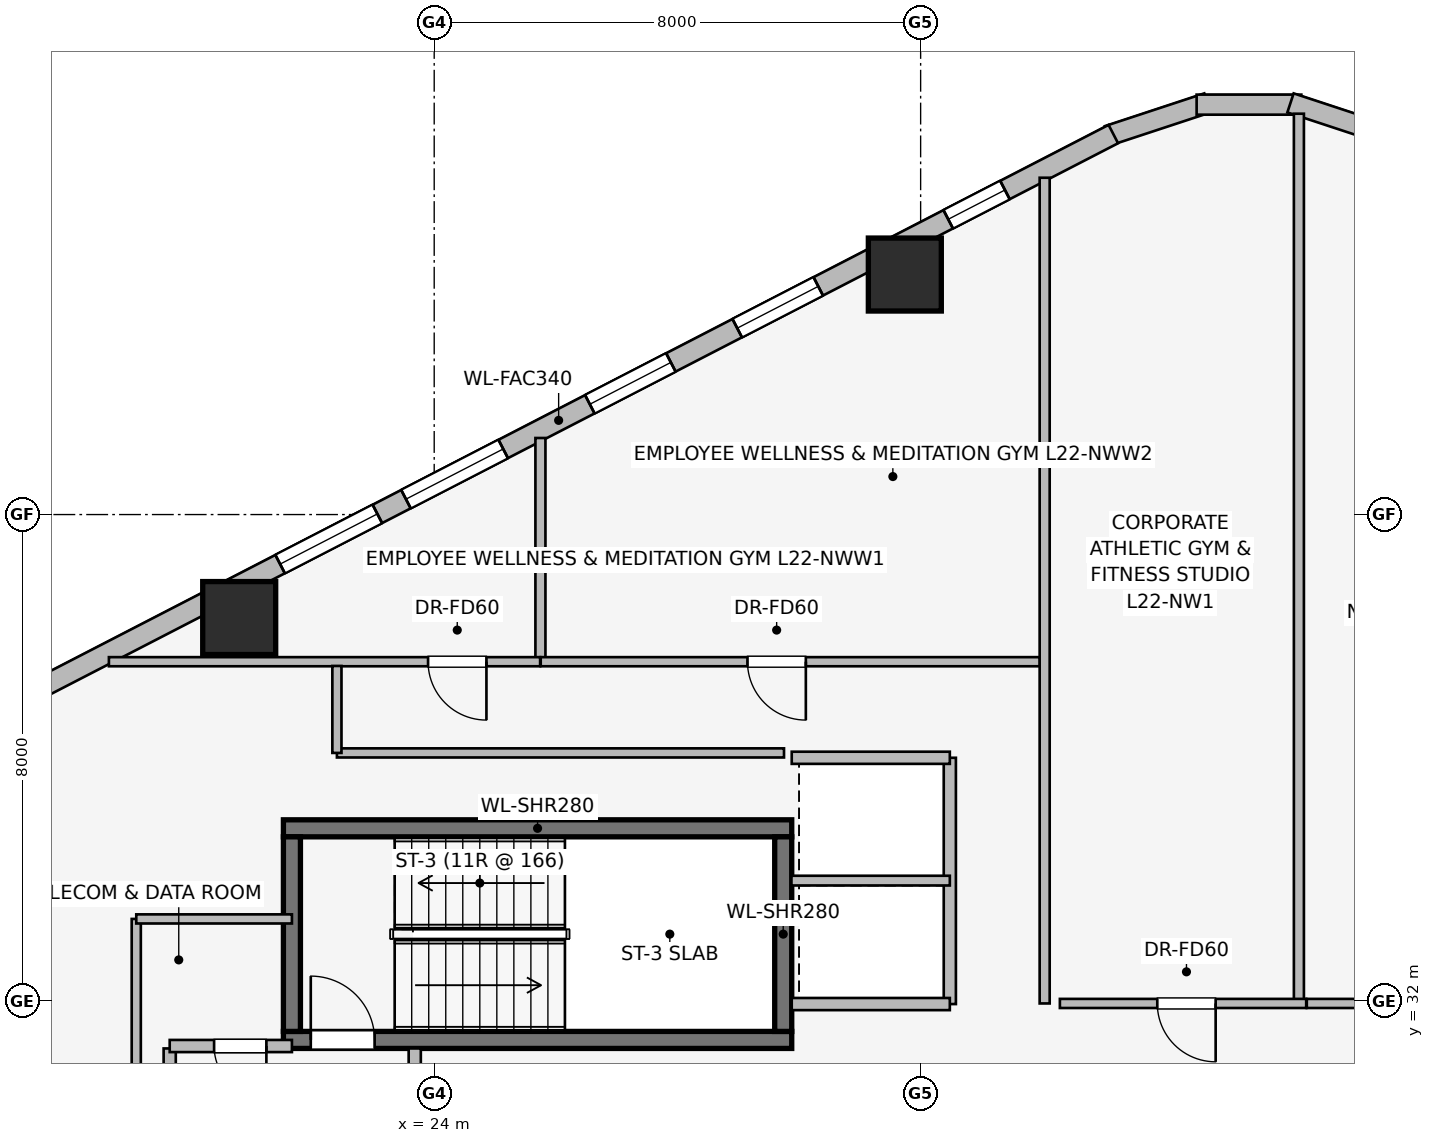
"""IFC4 building model, lengths in metres.
Left out: names, types, materials, properties, quantities, classifications, styles, units other than length and angle.
Written with IfcOpenShell. Run it as: python <this file> out.ifc"""

import sys

from ifc_helpers import new_model, si_unit, direction, frame, frame_2d, origin, origin_2d, place, context, subcontext, project, spatial, rectangle, extrude, element, fill, save


model = new_model("IFC4")
c1 = context("Model", 3, precision=1e-05, world=origin(), true_north=direction((0.0, 1.0)))
c2 = subcontext(c1, "Body", "Model", "MODEL_VIEW")
j1 = project(units=[si_unit("LENGTHUNIT", "METRE"), si_unit("PLANEANGLEUNIT", "RADIAN")], contexts=[c1])
p1 = place(None, origin())
s1 = spatial("IfcSite", under=j1, at=p1, CompositionType="ELEMENT")
p2 = place(p1, origin())
s2 = spatial("IfcBuilding", under=s1, at=p2, CompositionType="ELEMENT")
p3 = place(p2, frame((0.0, 0.0, 85.4)))
s3 = spatial("IfcBuildingStorey", under=s2, at=p3, CompositionType="ELEMENT", Elevation=85.4)
p4 = place(p3, frame((21.52, 31.36, 0.0), z_axis=(0.0, 0.0, 1.0), x_axis=(1.0, 0.0, 0.0)))
e1 = element("IfcWall", 1, at=p4, inside=s3, PredefinedType="SHEAR", context=c2, shape_type="SweptSolid", body=[
    extrude(rectangle(XDim=8.36, YDim=0.28, at=frame_2d((4.18, 0.0))), origin(), (0.0, 0.0, 1.0), 3.65),
])
p5 = place(p4, frame((0.45, 0.0, 0.0)))
e2 = element("IfcOpeningElement", 2, at=p5, cuts=e1, PredefinedType="OPENING", context=c2, shape_type="SweptSolid", body=[
    extrude(rectangle(XDim=1.05, YDim=2.0, at=frame_2d((0.525, 1.0))), frame((0.0, 0.15, 0.0), z_axis=(0.0, -1.0, 0.0), x_axis=(1.0, 0.0, 0.0)), (0.0, 0.0, 1.0), 0.3),
])
p6 = place(p3, frame((29.88, 34.84, 0.0), z_axis=(0.0, 0.0, 1.0), x_axis=(-1.0, 0.0, 0.0)))
e3 = element("IfcWall", 3, at=p6, inside=s3, PredefinedType="SHEAR", context=c2, shape_type="SweptSolid", body=[
    extrude(rectangle(XDim=8.36, YDim=0.28, at=frame_2d((4.18, 0.0))), origin(), (0.0, 0.0, 1.0), 3.65),
])
for number, where, z_axis, x_axis in (
    (4, (21.66, 34.7, 0.0), (0.0, 0.0, 1.0), (0.0, -1.0, 0.0)),
    (5, (29.74, 31.5, 0.0), (0.0, 0.0, 1.0), (0.0, 1.0, 0.0)),
):
    element("IfcWall", number, at=place(p3, frame(where, z_axis=z_axis, x_axis=x_axis)), inside=s3, PredefinedType="SHEAR", context=c2, shape_type="SweptSolid", body=[
        extrude(rectangle(XDim=3.2, YDim=0.28, at=frame_2d((1.6, 0.0))), origin(), (0.0, 0.0, 1.0), 3.65),
    ])
for number, where, z_axis, x_axis in (
    (6, (31.74, 43.947, 0.0), (0.0, 0.0, 1.0), (1.0, 0.0, 0.0)),
    (7, (20.793, 38.298, 0.0), (0.0, 0.0, 1.0), (1.0, 0.0, 0.0)),
):
    element("IfcColumn", number, at=place(p3, frame(where, z_axis=z_axis, x_axis=x_axis)), inside=s3, PredefinedType="COLUMN", context=c2, shape_type="SweptSolid", body=[
        extrude(rectangle(XDim=1.2, YDim=1.2, at=origin_2d()), origin(), (0.0, 0.0, 1.0), 3.65),
    ])
p7 = place(p3, frame((35.081, 46.231, 0.0), z_axis=(0.0, 0.0, 1.0), x_axis=(0.94976901097, 0.312951794691, 0.0)))
e8 = element("IfcWall", 8, at=p7, inside=s3, PredefinedType="STANDARD", context=c2, shape_type="SweptSolid", body=[
    extrude(rectangle(XDim=1.722, YDim=0.33, at=frame_2d((0.861, 0.0))), origin(), (0.0, 0.0, 1.0), 3.39),
])
p8 = place(p3, frame((36.539, 46.741, 0.0), z_axis=(0.0, 0.0, 1.0), x_axis=(1.0, 0.0, 0.0)))
e9 = element("IfcWall", 9, at=p8, inside=s3, PredefinedType="STANDARD", context=c2, shape_type="SweptSolid", body=[
    extrude(rectangle(XDim=1.722, YDim=0.33, at=frame_2d((0.861, 0.0))), origin(), (0.0, 0.0, 1.0), 3.39),
])
p9 = place(p3, frame((38.083, 46.77, 0.0), z_axis=(0.0, 0.0, 1.0), x_axis=(0.94976901097, -0.312951794691, 0.0)))
e10 = element("IfcWall", 10, at=p9, inside=s3, PredefinedType="STANDARD", context=c2, shape_type="SweptSolid", body=[
    extrude(rectangle(XDim=1.722, YDim=0.33, at=frame_2d((0.861, 0.0))), origin(), (0.0, 0.0, 1.0), 3.39),
])
p10 = place(p3, frame((16.924, 36.841, 0.0), z_axis=(0.0, 0.0, 1.0), x_axis=(0.888634413993, 0.458616264721, 0.0)))
e11 = element("IfcWall", 11, at=p10, inside=s3, PredefinedType="STANDARD", context=c2, shape_type="SweptSolid", body=[
    extrude(rectangle(XDim=20.531, YDim=0.34, at=frame_2d((10.266, 0.0))), origin(), (0.0, 0.0, 1.0), 2.684),
])
p11 = place(p10, frame((5.111, 0.0, 0.75)))
e12 = element("IfcOpeningElement", 12, at=p11, cuts=e11, PredefinedType="OPENING", context=c2, shape_type="SweptSolid", body=[
    extrude(rectangle(XDim=1.8, YDim=1.5, at=frame_2d((0.9, 0.75))), frame((0.0, 0.18, 0.0), z_axis=(0.0, -1.0, 0.0), x_axis=(1.0, 0.0, 0.0)), (0.0, 0.0, 1.0), 0.36),
])
p12 = place(p10, frame((7.44, 0.0, 0.75)))
e13 = element("IfcOpeningElement", 13, at=p12, cuts=e11, PredefinedType="OPENING", context=c2, shape_type="SweptSolid", body=[
    extrude(rectangle(XDim=1.8, YDim=1.5, at=frame_2d((0.9, 0.75))), frame((0.0, 0.18, 0.0), z_axis=(0.0, -1.0, 0.0), x_axis=(1.0, 0.0, 0.0)), (0.0, 0.0, 1.0), 0.36),
])
p13 = place(p10, frame((10.843, 0.0, 0.75)))
e14 = element("IfcOpeningElement", 14, at=p13, cuts=e11, PredefinedType="OPENING", context=c2, shape_type="SweptSolid", body=[
    extrude(rectangle(XDim=1.5, YDim=1.5, at=frame_2d((0.75, 0.75))), frame((0.0, 0.18, 0.0), z_axis=(0.0, -1.0, 0.0), x_axis=(1.0, 0.0, 0.0)), (0.0, 0.0, 1.0), 0.36),
])
p14 = place(p10, frame((13.571, 0.0, 0.75)))
e15 = element("IfcOpeningElement", 15, at=p14, cuts=e11, PredefinedType="OPENING", context=c2, shape_type="SweptSolid", body=[
    extrude(rectangle(XDim=1.5, YDim=1.5, at=frame_2d((0.75, 0.75))), frame((0.0, 0.18, 0.0), z_axis=(0.0, -1.0, 0.0), x_axis=(1.0, 0.0, 0.0)), (0.0, 0.0, 1.0), 0.36),
])
p15 = place(p10, frame((17.476, 0.0, 0.75)))
e16 = element("IfcOpeningElement", 16, at=p15, cuts=e11, PredefinedType="OPENING", context=c2, shape_type="SweptSolid", body=[
    extrude(rectangle(XDim=1.05, YDim=1.4, at=frame_2d((0.525, 0.7))), frame((0.0, 0.18, 0.0), z_axis=(0.0, -1.0, 0.0), x_axis=(1.0, 0.0, 0.0)), (0.0, 0.0, 1.0), 0.36),
])
p16 = place(p3, frame((19.65, 25.68, 0.0), z_axis=(0.0, 0.0, 1.0), x_axis=(0.0, 1.0, 0.0)))
e17 = element("IfcWall", 17, at=p16, inside=s3, PredefinedType="PARTITIONING", context=c2, shape_type="SweptSolid", body=[
    extrude(rectangle(XDim=5.54, YDim=0.2, at=frame_2d((2.77, 0.0))), origin(), (0.0, 0.0, 1.0), 3.39),
])
p17 = place(p16, frame((0.62, 0.0, 0.0)))
e18 = element("IfcOpeningElement", 18, at=p17, cuts=e17, PredefinedType="OPENING", context=c2, shape_type="SweptSolid", body=[
    extrude(rectangle(XDim=1.1, YDim=2.2, at=frame_2d((0.55, 1.1))), frame((0.0, 0.11, 0.0), z_axis=(0.0, -1.0, 0.0), x_axis=(1.0, 0.0, 0.0)), (0.0, 0.0, 1.0), 0.22),
])
p18 = place(p16, frame((3.12, 0.0, 0.0)))
e19 = element("IfcOpeningElement", 19, at=p18, cuts=e17, PredefinedType="OPENING", context=c2, shape_type="SweptSolid", body=[
    extrude(rectangle(XDim=1.1, YDim=2.2, at=frame_2d((0.55, 1.1))), frame((0.0, 0.11, 0.0), z_axis=(0.0, -1.0, 0.0), x_axis=(1.0, 0.0, 0.0)), (0.0, 0.0, 1.0), 0.22),
])
p19 = place(p3, frame((23.68, 25.68, 0.0), z_axis=(0.0, 0.0, 1.0), x_axis=(0.0, 1.0, 0.0)))
e20 = element("IfcWall", 20, at=p19, inside=s3, PredefinedType="PARTITIONING", context=c2, shape_type="SweptSolid", body=[
    extrude(rectangle(XDim=5.54, YDim=0.2, at=frame_2d((2.77, 0.0))), origin(), (0.0, 0.0, 1.0), 3.39),
])
p20 = place(p19, frame((1.8, 0.0, 0.0)))
e21 = element("IfcOpeningElement", 21, at=p20, cuts=e20, PredefinedType="OPENING", context=c2, shape_type="SweptSolid", body=[
    extrude(rectangle(XDim=1.05, YDim=2.0, at=frame_2d((0.525, 1.0))), frame((0.0, 0.11, 0.0), z_axis=(0.0, -1.0, 0.0), x_axis=(1.0, 0.0, 0.0)), (0.0, 0.0, 1.0), 0.22),
])
p21 = place(p3, frame((21.66, 31.26, 0.0), z_axis=(0.0, 0.0, 1.0), x_axis=(-1.0, 0.0, 0.0)))
e22 = element("IfcWall", 22, at=p21, inside=s3, PredefinedType="PARTITIONING", context=c2, shape_type="SweptSolid", body=[
    extrude(rectangle(XDim=2.01, YDim=0.2, at=frame_2d((1.005, 0.0))), origin(), (0.0, 0.0, 1.0), 3.39),
])
p22 = place(p21, frame((0.42, 0.0, 0.0)))
e23 = element("IfcOpeningElement", 23, at=p22, cuts=e22, PredefinedType="OPENING", context=c2, shape_type="SweptSolid", body=[
    extrude(rectangle(XDim=0.86, YDim=2.0, at=frame_2d((0.43, 1.0))), frame((0.0, 0.11, 0.0), z_axis=(0.0, -1.0, 0.0), x_axis=(1.0, 0.0, 0.0)), (0.0, 0.0, 1.0), 0.22),
])
p23 = place(p3, frame((32.48, 31.95, 0.0), z_axis=(0.0, 0.0, 1.0), x_axis=(0.0, 1.0, 0.0)))
e24 = element("IfcWall", 24, at=p23, inside=s3, PredefinedType="PARTITIONING", context=c2, shape_type="SweptSolid", body=[
    extrude(rectangle(XDim=4.05, YDim=0.2, at=frame_2d((2.025, 0.0))), origin(), (0.0, 0.0, 1.0), 2.513),
])
for number, where, z_axis, x_axis in (
    (25, (29.88, 36.0, 0.0), (0.0, 0.0, 1.0), (1.0, 0.0, 0.0)),
    (26, (32.48, 31.95, 0.0), (0.0, 0.0, 1.0), (-1.0, 0.0, 0.0)),
):
    element("IfcWall", number, at=place(p3, frame(where, z_axis=z_axis, x_axis=x_axis)), inside=s3, PredefinedType="PARTITIONING", context=c2, shape_type="SweptSolid", body=[
        extrude(rectangle(XDim=2.6, YDim=0.2, at=frame_2d((1.3, 0.0))), origin(), (0.0, 0.0, 1.0), 3.39),
    ])
p24 = place(p3, frame((29.875, 33.98, 0.0), z_axis=(0.0, 0.0, 1.0), x_axis=(1.0, 0.0, 0.0)))
e27 = element("IfcWall", 27, at=p24, inside=s3, PredefinedType="PARTITIONING", context=c2, shape_type="SweptSolid", body=[
    extrude(rectangle(XDim=2.605, YDim=0.16, at=frame_2d((1.302, 0.0))), origin(), (0.0, 0.0, 1.0), 3.39),
])
p25 = place(p3, frame((19.1, 33.35, 0.0), z_axis=(0.0, 0.0, 1.0), x_axis=(0.0, -1.0, 0.0)))
e28 = element("IfcWall", 28, at=p25, inside=s3, PredefinedType="PARTITIONING", context=c2, shape_type="SweptSolid", body=[
    extrude(rectangle(XDim=2.655, YDim=0.15, at=frame_2d((1.328, 0.0))), origin(), (0.0, 0.0, 1.0), 3.39),
])
p26 = place(p3, frame((21.66, 33.35, 0.0), z_axis=(0.0, 0.0, 1.0), x_axis=(-1.0, 0.0, 0.0)))
e29 = element("IfcWall", 29, at=p26, inside=s3, PredefinedType="PARTITIONING", context=c2, shape_type="SweptSolid", body=[
    extrude(rectangle(XDim=2.56, YDim=0.15, at=frame_2d((1.28, 0.0))), origin(), (0.0, 0.0, 1.0), 3.39),
])
p27 = place(p3, frame((25.747, 37.61, 0.0), z_axis=(0.0, 0.0, 1.0), x_axis=(0.0, 1.0, 0.0)))
e30 = element("IfcWall", 30, at=p27, inside=s3, PredefinedType="PARTITIONING", context=c2, shape_type="SweptSolid", body=[
    extrude(rectangle(XDim=3.649, YDim=0.165, at=frame_2d((1.824, 0.0))), origin(), (0.0, 0.0, 1.0), 3.39),
])
p28 = place(p3, frame((25.742, 37.58, 0.0), z_axis=(0.0, 0.0, 1.0), x_axis=(-1.0, 0.0, 0.0)))
e31 = element("IfcWall", 31, at=p28, inside=s3, PredefinedType="PARTITIONING", context=c2, shape_type="SweptSolid", body=[
    extrude(rectangle(XDim=7.092, YDim=0.15, at=frame_2d((3.546, 0.0))), origin(), (0.0, 0.0, 1.0), 3.39),
])
p29 = place(p28, frame((0.883, 0.0, 0.0)))
e32 = element("IfcOpeningElement", 32, at=p29, cuts=e31, PredefinedType="OPENING", context=c2, shape_type="SweptSolid", body=[
    extrude(rectangle(XDim=0.96, YDim=2.0, at=frame_2d((0.48, 1.0))), frame((0.0, 0.085, 0.0), z_axis=(0.0, -1.0, 0.0), x_axis=(1.0, 0.0, 0.0)), (0.0, 0.0, 1.0), 0.17),
])
p30 = place(p3, frame((33.962, 37.58, 0.0), z_axis=(0.0, 0.0, 1.0), x_axis=(-1.0, 0.0, 0.0)))
e33 = element("IfcWall", 33, at=p30, inside=s3, PredefinedType="PARTITIONING", context=c2, shape_type="SweptSolid", body=[
    extrude(rectangle(XDim=8.21, YDim=0.15, at=frame_2d((4.105, 0.0))), origin(), (0.0, 0.0, 1.0), 3.39),
])
p31 = place(p30, frame((3.85, 0.0, 0.0)))
e34 = element("IfcOpeningElement", 34, at=p31, cuts=e33, PredefinedType="OPENING", context=c2, shape_type="SweptSolid", body=[
    extrude(rectangle(XDim=0.96, YDim=2.0, at=frame_2d((0.48, 1.0))), frame((0.0, 0.085, 0.0), z_axis=(0.0, -1.0, 0.0), x_axis=(1.0, 0.0, 0.0)), (0.0, 0.0, 1.0), 0.17),
])
p32 = place(p3, frame((34.04, 31.96, 0.0), z_axis=(0.0, 0.0, 1.0), x_axis=(0.0, 1.0, 0.0)))
e35 = element("IfcWall", 35, at=p32, inside=s3, PredefinedType="PARTITIONING", context=c2, shape_type="SweptSolid", body=[
    extrude(rectangle(XDim=13.579, YDim=0.165, at=frame_2d((6.79, 0.0))), origin(), (0.0, 0.0, 1.0), 3.39),
])
p33 = place(p3, frame((38.221, 31.97, 0.0), z_axis=(0.0, 0.0, 1.0), x_axis=(0.0, 1.0, 0.0)))
e36 = element("IfcWall", 36, at=p33, inside=s3, PredefinedType="PARTITIONING", context=c2, shape_type="SweptSolid", body=[
    extrude(rectangle(XDim=14.622, YDim=0.165, at=frame_2d((7.311, 0.0))), origin(), (0.0, 0.0, 1.0), 3.39),
])
p34 = place(p3, frame((38.341, 31.96, 0.0), z_axis=(0.0, 0.0, 1.0), x_axis=(-1.0, 0.0, 0.0)))
e37 = element("IfcWall", 37, at=p34, inside=s3, PredefinedType="PARTITIONING", context=c2, shape_type="SweptSolid", body=[
    extrude(rectangle(XDim=4.051, YDim=0.15, at=frame_2d((2.025, 0.0))), origin(), (0.0, 0.0, 1.0), 3.39),
])
p35 = place(p34, frame((1.489, 0.0, 0.0)))
e38 = element("IfcOpeningElement", 38, at=p35, cuts=e37, PredefinedType="OPENING", context=c2, shape_type="SweptSolid", body=[
    extrude(rectangle(XDim=0.96, YDim=2.0, at=frame_2d((0.48, 1.0))), frame((0.0, 0.085, 0.0), z_axis=(0.0, -1.0, 0.0), x_axis=(1.0, 0.0, 0.0)), (0.0, 0.0, 1.0), 0.17),
])
p36 = place(p3, frame((42.605, 31.96, 0.0), z_axis=(0.0, 0.0, 1.0), x_axis=(-1.0, 0.0, 0.0)))
e39 = element("IfcWall", 39, at=p36, inside=s3, PredefinedType="PARTITIONING", context=c2, shape_type="SweptSolid", body=[
    extrude(rectangle(XDim=4.254, YDim=0.15, at=frame_2d((2.127, 0.0))), origin(), (0.0, 0.0, 1.0), 3.39),
])
p37 = place(p36, frame((1.704, 0.0, 0.0)))
e40 = element("IfcOpeningElement", 40, at=p37, cuts=e39, PredefinedType="OPENING", context=c2, shape_type="SweptSolid", body=[
    extrude(rectangle(XDim=0.96, YDim=2.0, at=frame_2d((0.48, 1.0))), frame((0.0, 0.085, 0.0), z_axis=(0.0, -1.0, 0.0), x_axis=(1.0, 0.0, 0.0)), (0.0, 0.0, 1.0), 0.17),
])
p38 = place(p3, frame((29.753, 36.08, 0.0), z_axis=(0.0, 0.0, 1.0), x_axis=(-1.0, 0.0, 0.0)))
e41 = element("IfcWall", 41, at=p38, inside=s3, PredefinedType="PARTITIONING", context=c2, shape_type="SweptSolid", body=[
    extrude(rectangle(XDim=7.353, YDim=0.15, at=frame_2d((3.677, 0.0))), origin(), (0.0, 0.0, 1.0), 3.39),
])
p39 = place(p3, frame((22.4, 36.08, 0.0), z_axis=(0.0, 0.0, 1.0), x_axis=(0.0, 1.0, 0.0)))
e42 = element("IfcWall", 42, at=p39, inside=s3, PredefinedType="PARTITIONING", context=c2, shape_type="SweptSolid", body=[
    extrude(rectangle(XDim=1.43, YDim=0.15, at=frame_2d((0.715, 0.0))), origin(), (0.0, 0.0, 1.0), 3.39),
])
p40 = place(p11, origin())
e43 = element("IfcWindow", 43, at=p40, inside=s3, PartitioningType="SINGLE_PANEL", PredefinedType="WINDOW", context=c2, shape_type="SweptSolid", body=[
    extrude(rectangle(XDim=1.8, YDim=1.5, at=frame_2d((0.9, 0.75))), frame((0.0, 0.03, 0.0), z_axis=(0.0, -1.0, 0.0), x_axis=(1.0, 0.0, 0.0)), (0.0, 0.0, 1.0), 0.06),
])
fill(e12, e43)
p41 = place(p12, origin())
e44 = element("IfcWindow", 44, at=p41, inside=s3, PartitioningType="SINGLE_PANEL", PredefinedType="WINDOW", context=c2, shape_type="SweptSolid", body=[
    extrude(rectangle(XDim=1.8, YDim=1.5, at=frame_2d((0.9, 0.75))), frame((0.0, 0.03, 0.0), z_axis=(0.0, -1.0, 0.0), x_axis=(1.0, 0.0, 0.0)), (0.0, 0.0, 1.0), 0.06),
])
fill(e13, e44)
p42 = place(p13, origin())
e45 = element("IfcWindow", 45, at=p42, inside=s3, PartitioningType="SINGLE_PANEL", PredefinedType="WINDOW", context=c2, shape_type="SweptSolid", body=[
    extrude(rectangle(XDim=1.5, YDim=1.5, at=frame_2d((0.75, 0.75))), frame((0.0, 0.03, 0.0), z_axis=(0.0, -1.0, 0.0), x_axis=(1.0, 0.0, 0.0)), (0.0, 0.0, 1.0), 0.06),
])
fill(e14, e45)
p43 = place(p14, origin())
e46 = element("IfcWindow", 46, at=p43, inside=s3, PartitioningType="SINGLE_PANEL", PredefinedType="WINDOW", context=c2, shape_type="SweptSolid", body=[
    extrude(rectangle(XDim=1.5, YDim=1.5, at=frame_2d((0.75, 0.75))), frame((0.0, 0.03, 0.0), z_axis=(0.0, -1.0, 0.0), x_axis=(1.0, 0.0, 0.0)), (0.0, 0.0, 1.0), 0.06),
])
fill(e15, e46)
p44 = place(p15, origin())
e47 = element("IfcWindow", 47, at=p44, inside=s3, PartitioningType="SINGLE_PANEL", PredefinedType="WINDOW", context=c2, shape_type="SweptSolid", body=[
    extrude(rectangle(XDim=1.05, YDim=1.4, at=frame_2d((0.525, 0.7))), frame((0.0, 0.03, 0.0), z_axis=(0.0, -1.0, 0.0), x_axis=(1.0, 0.0, 0.0)), (0.0, 0.0, 1.0), 0.06),
])
fill(e16, e47)
p45 = place(p5, origin())
e48 = element("IfcDoor", 48, at=p45, inside=s3, OperationType="SINGLE_SWING_LEFT", PredefinedType="DOOR", context=c2, shape_type="SweptSolid", body=[
    extrude(rectangle(XDim=1.05, YDim=2.0, at=frame_2d((0.525, 1.0))), frame((0.0, 0.025, 0.0), z_axis=(0.0, -1.0, 0.0), x_axis=(1.0, 0.0, 0.0)), (0.0, 0.0, 1.0), 0.05),
])
fill(e2, e48)
p46 = place(p22, origin())
e49 = element("IfcDoor", 49, at=p46, inside=s3, OperationType="SINGLE_SWING_LEFT", PredefinedType="DOOR", context=c2, shape_type="SweptSolid", body=[
    extrude(rectangle(XDim=0.86, YDim=2.0, at=frame_2d((0.43, 1.0))), frame((0.0, 0.025, 0.0), z_axis=(0.0, -1.0, 0.0), x_axis=(1.0, 0.0, 0.0)), (0.0, 0.0, 1.0), 0.05),
])
fill(e23, e49)
p47 = place(p29, origin())
e50 = element("IfcDoor", 50, at=p47, inside=s3, OperationType="SINGLE_SWING_LEFT", PredefinedType="DOOR", context=c2, shape_type="SweptSolid", body=[
    extrude(rectangle(XDim=0.96, YDim=2.0, at=frame_2d((0.48, 1.0))), frame((0.0, 0.025, 0.0), z_axis=(0.0, -1.0, 0.0), x_axis=(1.0, 0.0, 0.0)), (0.0, 0.0, 1.0), 0.05),
])
fill(e32, e50)
p48 = place(p31, origin())
e51 = element("IfcDoor", 51, at=p48, inside=s3, OperationType="SINGLE_SWING_LEFT", PredefinedType="DOOR", context=c2, shape_type="SweptSolid", body=[
    extrude(rectangle(XDim=0.96, YDim=2.0, at=frame_2d((0.48, 1.0))), frame((0.0, 0.025, 0.0), z_axis=(0.0, -1.0, 0.0), x_axis=(1.0, 0.0, 0.0)), (0.0, 0.0, 1.0), 0.05),
])
fill(e34, e51)
p49 = place(p35, origin())
e52 = element("IfcDoor", 52, at=p49, inside=s3, OperationType="SINGLE_SWING_LEFT", PredefinedType="DOOR", context=c2, shape_type="SweptSolid", body=[
    extrude(rectangle(XDim=0.96, YDim=2.0, at=frame_2d((0.48, 1.0))), frame((0.0, 0.025, 0.0), z_axis=(0.0, -1.0, 0.0), x_axis=(1.0, 0.0, 0.0)), (0.0, 0.0, 1.0), 0.05),
])
fill(e38, e52)
save(model, sys.argv[1])
